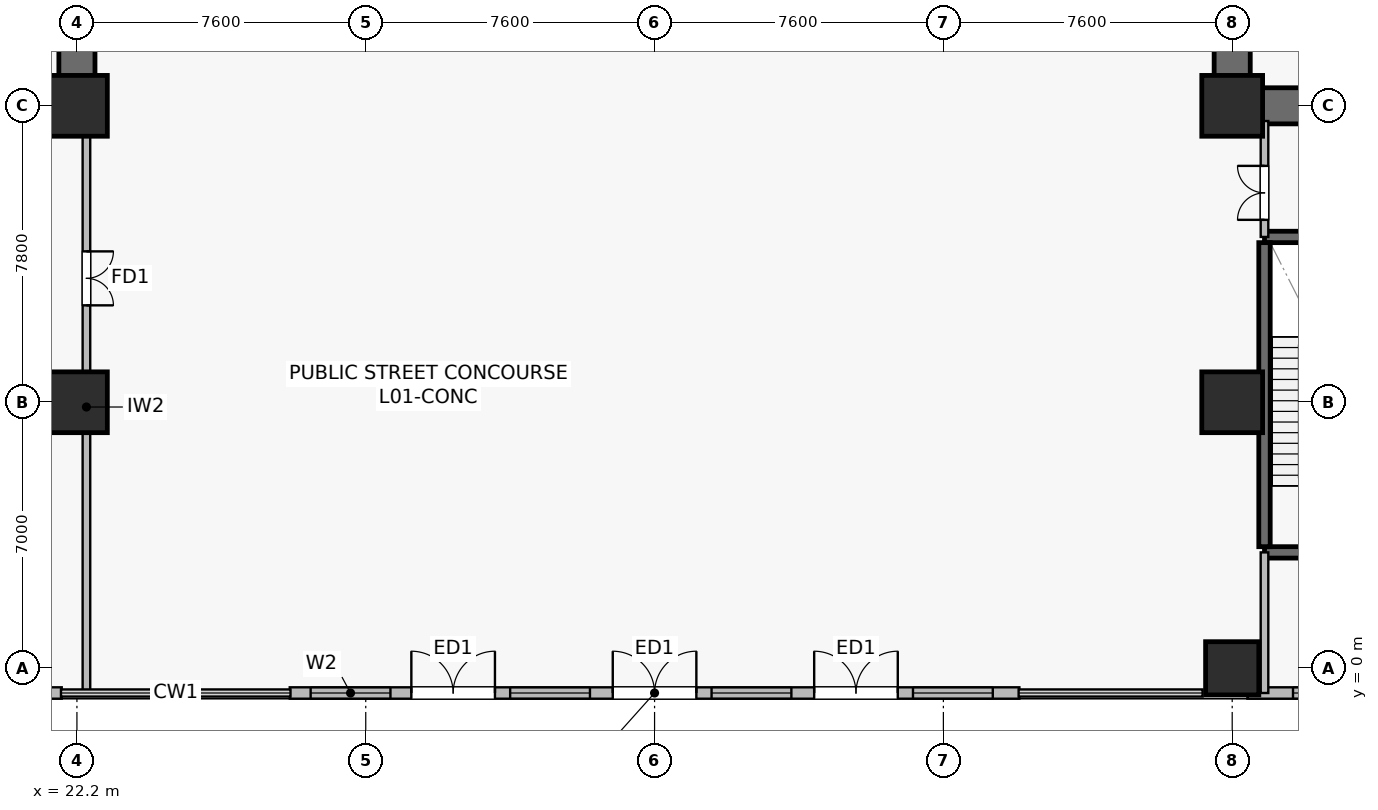
"""IFC4 building model, lengths in metres.
Left out: names, types, materials, properties, quantities, classifications, styles, units other than length and angle.
Written with IfcOpenShell. Run it as: python <this file> out.ifc"""

import sys

from ifc_helpers import new_model, si_unit, direction, frame, frame_2d, origin, origin_2d, place, context, subcontext, project, spatial, rectangle, extrude, source, transform, mapped, element, fill, save


model = new_model("IFC4")
c1 = context("Model", 3, precision=1e-05, world=origin(), true_north=direction((0.0, 1.0)))
c2 = subcontext(c1, "Body", "Model", "MODEL_VIEW")
j1 = project(units=[si_unit("LENGTHUNIT", "METRE"), si_unit("PLANEANGLEUNIT", "RADIAN")], contexts=[c1])
p1 = place(None, origin())
s1 = spatial("IfcSite", under=j1, at=p1, CompositionType="ELEMENT")
p2 = place(p1, origin())
s2 = spatial("IfcBuilding", under=s1, at=p2, CompositionType="ELEMENT")
p3 = place(p2, origin())
s3 = spatial("IfcBuildingStorey", under=s2, at=p3, CompositionType="ELEMENT", Elevation=0.0)
p4 = place(p3, frame((6.925, 14.8, 0.0), z_axis=(0.0, 0.0, 1.0), x_axis=(1.0, 0.0, 0.0)))
e1 = element("IfcWall", 1, at=p4, inside=s3, PredefinedType="SHEAR", context=c2, shape_type="SweptSolid", body=[
    extrude(rectangle(XDim=15.75, YDim=0.95, at=frame_2d((7.875, 0.0))), origin(), (0.0, 0.0, 1.0), 5.05),
])
p5 = place(p4, frame((12.275, 0.0, 0.0)))
e2 = element("IfcOpeningElement", 2, at=p5, cuts=e1, PredefinedType="OPENING", context=c2, shape_type="SweptSolid", body=[
    extrude(rectangle(XDim=1.2, YDim=2.16, at=frame_2d((0.6, 1.08))), frame((0.0, 0.485, 0.0), z_axis=(0.0, -1.0, 0.0), x_axis=(1.0, 0.0, 0.0)), (0.0, 0.0, 1.0), 0.97),
])
p6 = place(p3, frame((22.2, 15.275, 0.0), z_axis=(0.0, 0.0, 1.0), x_axis=(0.0, 1.0, 0.0)))
e3 = element("IfcWall", 3, at=p6, inside=s3, PredefinedType="SHEAR", context=c2, shape_type="SweptSolid", body=[
    extrude(rectangle(XDim=18.05, YDim=0.95, at=frame_2d((9.025, 0.0))), origin(), (0.0, 0.0, 1.0), 5.05),
])
p7 = place(p6, frame((3.275, 0.0, 0.0)))
e4 = element("IfcOpeningElement", 4, at=p7, cuts=e3, PredefinedType="OPENING", context=c2, shape_type="SweptSolid", body=[
    extrude(rectangle(XDim=1.42, YDim=2.2, at=frame_2d((0.71, 1.1))), frame((0.0, 0.485, 0.0), z_axis=(0.0, -1.0, 0.0), x_axis=(1.0, 0.0, 0.0)), (0.0, 0.0, 1.0), 0.97),
])
p8 = place(p3, frame((52.125, 14.8, 0.0), z_axis=(0.0, 0.0, 1.0), x_axis=(1.0, 0.0, 0.0)))
e5 = element("IfcWall", 5, at=p8, inside=s3, PredefinedType="SHEAR", context=c2, shape_type="SweptSolid", body=[
    extrude(rectangle(XDim=15.75, YDim=0.95, at=frame_2d((7.875, 0.0))), origin(), (0.0, 0.0, 1.0), 5.05),
])
p9 = place(p8, frame((2.275, 0.0, 0.0)))
e6 = element("IfcOpeningElement", 6, at=p9, cuts=e5, PredefinedType="OPENING", context=c2, shape_type="SweptSolid", body=[
    extrude(rectangle(XDim=1.2, YDim=2.16, at=frame_2d((0.6, 1.08))), frame((0.0, 0.485, 0.0), z_axis=(0.0, -1.0, 0.0), x_axis=(1.0, 0.0, 0.0)), (0.0, 0.0, 1.0), 0.97),
])
p10 = place(p3, frame((52.6, 15.275, 0.0), z_axis=(0.0, 0.0, 1.0), x_axis=(0.0, 1.0, 0.0)))
e7 = element("IfcWall", 7, at=p10, inside=s3, PredefinedType="SHEAR", context=c2, shape_type="SweptSolid", body=[
    extrude(rectangle(XDim=18.05, YDim=0.95, at=frame_2d((9.025, 0.0))), origin(), (0.0, 0.0, 1.0), 5.05),
])
p11 = place(p10, frame((3.275, 0.0, 0.0)))
e8 = element("IfcOpeningElement", 8, at=p11, cuts=e7, PredefinedType="OPENING", context=c2, shape_type="SweptSolid", body=[
    extrude(rectangle(XDim=1.42, YDim=2.2, at=frame_2d((0.71, 1.1))), frame((0.0, 0.485, 0.0), z_axis=(0.0, -1.0, 0.0), x_axis=(1.0, 0.0, 0.0)), (0.0, 0.0, 1.0), 0.97),
])
for number, where, z_axis, x_axis in (
    (9, (53.45, 3.05, 0.0), (0.0, 0.0, 1.0), (1.0, 0.0, 0.0)),
    (10, (53.45, 11.35, 0.0), (0.0, 0.0, 1.0), (1.0, 0.0, 0.0)),
):
    element("IfcWall", number, at=place(p3, frame(where, z_axis=z_axis, x_axis=x_axis)), inside=s3, PredefinedType="SHEAR", context=c2, shape_type="SweptSolid", body=[
        extrude(rectangle(XDim=3.5, YDim=0.3, at=frame_2d((1.75, 0.0))), origin(), (0.0, 0.0, 1.0), 5.05),
    ])
p12 = place(p3, frame((53.45, 3.2, 0.0), z_axis=(0.0, 0.0, 1.0), x_axis=(0.0, 1.0, 0.0)))
e11 = element("IfcWall", 11, at=p12, inside=s3, PredefinedType="SHEAR", context=c2, shape_type="SweptSolid", body=[
    extrude(rectangle(XDim=8.0, YDim=0.3, at=frame_2d((4.0, 0.0))), origin(), (0.0, 0.0, 1.0), 5.05),
])
m1 = source(origin(), c2, "Body", "SweptSolid", [
    extrude(rectangle(XDim=1.6, YDim=1.6, at=origin_2d()), origin(), (0.0, 0.0, 1.0), 5.4),
])
for number, where, z_axis, x_axis in (
    (12, (22.2, 7.0, 0.0), (0.0, 0.0, 1.0), (1.0, 0.0, 0.0)),
    (13, (22.2, 14.8, 0.0), (0.0, 0.0, 1.0), (1.0, 0.0, 0.0)),
    (14, (52.6, 7.0, 0.0), (0.0, 0.0, 1.0), (1.0, 0.0, 0.0)),
    (15, (52.6, 14.8, 0.0), (0.0, 0.0, 1.0), (1.0, 0.0, 0.0)),
):
    element("IfcColumn", number, at=place(p3, frame(where, z_axis=z_axis, x_axis=x_axis)), inside=s3, PredefinedType="COLUMN", context=c2, shape_type="MappedRepresentation", body=[
        mapped(m1, transform((0.0, 0.0, 0.0), scale=1.0)),
    ])
m2 = source(origin(), c2, "Body", "SweptSolid", [
    extrude(rectangle(XDim=1.4, YDim=1.4, at=origin_2d()), origin(), (0.0, 0.0, 1.0), 5.4),
])
p13 = place(p3, frame((52.6, 0.0, 0.0), z_axis=(0.0, 0.0, 1.0), x_axis=(1.0, 0.0, 0.0)))
e16 = element("IfcColumn", 16, at=p13, inside=s3, PredefinedType="COLUMN", context=c2, shape_type="MappedRepresentation", body=[
    mapped(m2, transform((0.0, 0.0, 0.0), scale=1.0)),
])
p14 = place(p3, frame((27.8, -0.65, 0.0), z_axis=(0.0, 0.0, 1.0), x_axis=(1.0, 0.0, 0.0)))
e17 = element("IfcWall", 17, at=p14, inside=s3, PredefinedType="STANDARD", context=c2, shape_type="SweptSolid", body=[
    extrude(rectangle(XDim=19.2, YDim=0.3, at=frame_2d((9.6, 0.0))), origin(), (0.0, 0.0, 1.0), 5.05),
])
p15 = place(p14, frame((3.2, 0.0, 0.0)))
e18 = element("IfcOpeningElement", 18, at=p15, cuts=e17, PredefinedType="OPENING", context=c2, shape_type="SweptSolid", body=[
    extrude(rectangle(XDim=2.2, YDim=2.6, at=frame_2d((1.1, 1.3))), frame((0.0, 0.16, 0.0), z_axis=(0.0, -1.0, 0.0), x_axis=(1.0, 0.0, 0.0)), (0.0, 0.0, 1.0), 0.32),
])
p16 = place(p14, frame((8.5, 0.0, 0.0)))
e19 = element("IfcOpeningElement", 19, at=p16, cuts=e17, PredefinedType="OPENING", context=c2, shape_type="SweptSolid", body=[
    extrude(rectangle(XDim=2.2, YDim=2.6, at=frame_2d((1.1, 1.3))), frame((0.0, 0.16, 0.0), z_axis=(0.0, -1.0, 0.0), x_axis=(1.0, 0.0, 0.0)), (0.0, 0.0, 1.0), 0.32),
])
p17 = place(p14, frame((13.8, 0.0, 0.0)))
e20 = element("IfcOpeningElement", 20, at=p17, cuts=e17, PredefinedType="OPENING", context=c2, shape_type="SweptSolid", body=[
    extrude(rectangle(XDim=2.2, YDim=2.6, at=frame_2d((1.1, 1.3))), frame((0.0, 0.16, 0.0), z_axis=(0.0, -1.0, 0.0), x_axis=(1.0, 0.0, 0.0)), (0.0, 0.0, 1.0), 0.32),
])
p18 = place(p14, frame((0.55, 0.0, 0.9)))
e21 = element("IfcOpeningElement", 21, at=p18, cuts=e17, PredefinedType="OPENING", context=c2, shape_type="SweptSolid", body=[
    extrude(rectangle(XDim=2.1, YDim=2.6, at=frame_2d((1.05, 1.3))), frame((0.0, 0.16, 0.0), z_axis=(0.0, -1.0, 0.0), x_axis=(1.0, 0.0, 0.0)), (0.0, 0.0, 1.0), 0.32),
])
p19 = place(p14, frame((5.8, 0.0, 0.9)))
e22 = element("IfcOpeningElement", 22, at=p19, cuts=e17, PredefinedType="OPENING", context=c2, shape_type="SweptSolid", body=[
    extrude(rectangle(XDim=2.1, YDim=2.6, at=frame_2d((1.05, 1.3))), frame((0.0, 0.16, 0.0), z_axis=(0.0, -1.0, 0.0), x_axis=(1.0, 0.0, 0.0)), (0.0, 0.0, 1.0), 0.32),
])
p20 = place(p14, frame((11.1, 0.0, 0.9)))
e23 = element("IfcOpeningElement", 23, at=p20, cuts=e17, PredefinedType="OPENING", context=c2, shape_type="SweptSolid", body=[
    extrude(rectangle(XDim=2.1, YDim=2.6, at=frame_2d((1.05, 1.3))), frame((0.0, 0.16, 0.0), z_axis=(0.0, -1.0, 0.0), x_axis=(1.0, 0.0, 0.0)), (0.0, 0.0, 1.0), 0.32),
])
p21 = place(p14, frame((16.4, 0.0, 0.9)))
e24 = element("IfcOpeningElement", 24, at=p21, cuts=e17, PredefinedType="OPENING", context=c2, shape_type="SweptSolid", body=[
    extrude(rectangle(XDim=2.1, YDim=2.6, at=frame_2d((1.05, 1.3))), frame((0.0, 0.16, 0.0), z_axis=(0.0, -1.0, 0.0), x_axis=(1.0, 0.0, 0.0)), (0.0, 0.0, 1.0), 0.32),
])
p22 = place(p3, frame((21.8, -0.65, 0.0), z_axis=(0.0, 0.0, 1.0), x_axis=(-1.0, 0.0, 0.0)))
e25 = element("IfcWall", 25, at=p22, inside=s3, PredefinedType="STANDARD", context=c2, shape_type="SweptSolid", body=[
    extrude(rectangle(XDim=20.0, YDim=0.3, at=frame_2d((10.0, 0.0))), origin(), (0.0, 0.0, 1.0), 5.05),
])
p23 = place(p22, frame((9.1, 0.0, 0.0)))
e26 = element("IfcOpeningElement", 26, at=p23, cuts=e25, PredefinedType="OPENING", context=c2, shape_type="SweptSolid", body=[
    extrude(rectangle(XDim=1.8, YDim=2.3, at=frame_2d((0.9, 1.15))), frame((0.0, 0.16, 0.0), z_axis=(0.0, -1.0, 0.0), x_axis=(1.0, 0.0, 0.0)), (0.0, 0.0, 1.0), 0.32),
])
p24 = place(p22, frame((1.2, 0.0, 0.9)))
e27 = element("IfcOpeningElement", 27, at=p24, cuts=e25, PredefinedType="OPENING", context=c2, shape_type="SweptSolid", body=[
    extrude(rectangle(XDim=2.4, YDim=2.8, at=frame_2d((1.2, 1.4))), frame((0.0, 0.16, 0.0), z_axis=(0.0, -1.0, 0.0), x_axis=(1.0, 0.0, 0.0)), (0.0, 0.0, 1.0), 0.32),
])
p25 = place(p22, frame((5.2, 0.0, 0.9)))
e28 = element("IfcOpeningElement", 28, at=p25, cuts=e25, PredefinedType="OPENING", context=c2, shape_type="SweptSolid", body=[
    extrude(rectangle(XDim=2.4, YDim=2.8, at=frame_2d((1.2, 1.4))), frame((0.0, 0.16, 0.0), z_axis=(0.0, -1.0, 0.0), x_axis=(1.0, 0.0, 0.0)), (0.0, 0.0, 1.0), 0.32),
])
p26 = place(p22, frame((16.4, 0.0, 0.9)))
e29 = element("IfcOpeningElement", 29, at=p26, cuts=e25, PredefinedType="OPENING", context=c2, shape_type="SweptSolid", body=[
    extrude(rectangle(XDim=2.4, YDim=2.8, at=frame_2d((1.2, 1.4))), frame((0.0, 0.16, 0.0), z_axis=(0.0, -1.0, 0.0), x_axis=(1.0, 0.0, 0.0)), (0.0, 0.0, 1.0), 0.32),
])
p27 = place(p3, frame((73.0, -0.65, 0.0), z_axis=(0.0, 0.0, 1.0), x_axis=(-1.0, 0.0, 0.0)))
e30 = element("IfcWall", 30, at=p27, inside=s3, PredefinedType="STANDARD", context=c2, shape_type="SweptSolid", body=[
    extrude(rectangle(XDim=20.0, YDim=0.3, at=frame_2d((10.0, 0.0))), origin(), (0.0, 0.0, 1.0), 5.05),
])
p28 = place(p27, frame((9.1, 0.0, 0.0)))
e31 = element("IfcOpeningElement", 31, at=p28, cuts=e30, PredefinedType="OPENING", context=c2, shape_type="SweptSolid", body=[
    extrude(rectangle(XDim=1.8, YDim=2.3, at=frame_2d((0.9, 1.15))), frame((0.0, 0.16, 0.0), z_axis=(0.0, -1.0, 0.0), x_axis=(1.0, 0.0, 0.0)), (0.0, 0.0, 1.0), 0.32),
])
p29 = place(p27, frame((1.2, 0.0, 0.9)))
e32 = element("IfcOpeningElement", 32, at=p29, cuts=e30, PredefinedType="OPENING", context=c2, shape_type="SweptSolid", body=[
    extrude(rectangle(XDim=2.4, YDim=2.8, at=frame_2d((1.2, 1.4))), frame((0.0, 0.16, 0.0), z_axis=(0.0, -1.0, 0.0), x_axis=(1.0, 0.0, 0.0)), (0.0, 0.0, 1.0), 0.32),
])
p30 = place(p27, frame((5.2, 0.0, 0.9)))
e33 = element("IfcOpeningElement", 33, at=p30, cuts=e30, PredefinedType="OPENING", context=c2, shape_type="SweptSolid", body=[
    extrude(rectangle(XDim=2.4, YDim=2.8, at=frame_2d((1.2, 1.4))), frame((0.0, 0.16, 0.0), z_axis=(0.0, -1.0, 0.0), x_axis=(1.0, 0.0, 0.0)), (0.0, 0.0, 1.0), 0.32),
])
p31 = place(p27, frame((16.4, 0.0, 0.9)))
e34 = element("IfcOpeningElement", 34, at=p31, cuts=e30, PredefinedType="OPENING", context=c2, shape_type="SweptSolid", body=[
    extrude(rectangle(XDim=2.4, YDim=2.8, at=frame_2d((1.2, 1.4))), frame((0.0, 0.16, 0.0), z_axis=(0.0, -1.0, 0.0), x_axis=(1.0, 0.0, 0.0)), (0.0, 0.0, 1.0), 0.32),
])
p32 = place(p3, frame((22.45, 14.4, 0.0), z_axis=(0.0, 0.0, 1.0), x_axis=(0.0, -1.0, 0.0)))
e35 = element("IfcWall", 35, at=p32, inside=s3, PredefinedType="SOLIDWALL", context=c2, shape_type="SweptSolid", body=[
    extrude(rectangle(XDim=15.05, YDim=0.2, at=frame_2d((7.525, 0.0))), origin(), (0.0, 0.0, 1.0), 4.335),
])
p33 = place(p32, frame((3.43, 0.0, 0.0)))
e36 = element("IfcOpeningElement", 36, at=p33, cuts=e35, PredefinedType="OPENING", context=c2, shape_type="SweptSolid", body=[
    extrude(rectangle(XDim=1.42, YDim=2.2, at=frame_2d((0.71, 1.1))), frame((0.0, 0.11, 0.0), z_axis=(0.0, -1.0, 0.0), x_axis=(1.0, 0.0, 0.0)), (0.0, 0.0, 1.0), 0.22),
])
p34 = place(p3, frame((53.45, -0.65, 0.0), z_axis=(0.0, 0.0, 1.0), x_axis=(0.0, 1.0, 0.0)))
e37 = element("IfcWall", 37, at=p34, inside=s3, PredefinedType="SOLIDWALL", context=c2, shape_type="SweptSolid", body=[
    extrude(rectangle(XDim=3.7, YDim=0.2, at=frame_2d((1.85, 0.0))), origin(), (0.0, 0.0, 1.0), 5.05),
])
p35 = place(p3, frame((53.45, 11.35, 0.0), z_axis=(0.0, 0.0, 1.0), x_axis=(0.0, 1.0, 0.0)))
e38 = element("IfcWall", 38, at=p35, inside=s3, PredefinedType="SOLIDWALL", context=c2, shape_type="SweptSolid", body=[
    extrude(rectangle(XDim=3.05, YDim=0.2, at=frame_2d((1.525, 0.0))), origin(), (0.0, 0.0, 1.0), 5.05),
])
p36 = place(p35, frame((0.45, 0.0, 0.0)))
e39 = element("IfcOpeningElement", 39, at=p36, cuts=e38, PredefinedType="OPENING", context=c2, shape_type="SweptSolid", body=[
    extrude(rectangle(XDim=1.42, YDim=2.2, at=frame_2d((0.71, 1.1))), frame((0.0, 0.11, 0.0), z_axis=(0.0, -1.0, 0.0), x_axis=(1.0, 0.0, 0.0)), (0.0, 0.0, 1.0), 0.22),
])
m3 = source(origin(), c2, "Body", "SweptSolid", [
    extrude(rectangle(XDim=2.2, YDim=2.6, at=frame_2d((1.1, 1.3))), frame((0.0, 0.025, 0.0), z_axis=(0.0, -1.0, 0.0), x_axis=(1.0, 0.0, 0.0)), (0.0, 0.0, 1.0), 0.05),
])
p37 = place(p15, origin())
e40 = element("IfcDoor", 40, at=p37, inside=s3, OperationType="DOUBLE_DOOR_SINGLE_SWING", PredefinedType="DOOR", context=c2, shape_type="MappedRepresentation", body=[
    mapped(m3, transform((0.0, 0.0, 0.0), scale=1.0)),
])
fill(e18, e40)
p38 = place(p16, origin())
e41 = element("IfcDoor", 41, at=p38, inside=s3, OperationType="DOUBLE_DOOR_SINGLE_SWING", PredefinedType="DOOR", context=c2, shape_type="MappedRepresentation", body=[
    mapped(m3, transform((0.0, 0.0, 0.0), scale=1.0)),
])
fill(e19, e41)
p39 = place(p17, origin())
e42 = element("IfcDoor", 42, at=p39, inside=s3, OperationType="DOUBLE_DOOR_SINGLE_SWING", PredefinedType="DOOR", context=c2, shape_type="MappedRepresentation", body=[
    mapped(m3, transform((0.0, 0.0, 0.0), scale=1.0)),
])
fill(e20, e42)
m4 = source(origin(), c2, "Body", "SweptSolid", [
    extrude(rectangle(XDim=2.1, YDim=2.6, at=frame_2d((1.05, 1.3))), frame((0.0, 0.03, 0.0), z_axis=(0.0, -1.0, 0.0), x_axis=(1.0, 0.0, 0.0)), (0.0, 0.0, 1.0), 0.06),
])
p40 = place(p18, origin())
e43 = element("IfcWindow", 43, at=p40, inside=s3, PartitioningType="SINGLE_PANEL", PredefinedType="WINDOW", context=c2, shape_type="MappedRepresentation", body=[
    mapped(m4, transform((0.0, 0.0, 0.0), scale=1.0)),
])
fill(e21, e43)
p41 = place(p19, origin())
e44 = element("IfcWindow", 44, at=p41, inside=s3, PartitioningType="SINGLE_PANEL", PredefinedType="WINDOW", context=c2, shape_type="MappedRepresentation", body=[
    mapped(m4, transform((0.0, 0.0, 0.0), scale=1.0)),
])
fill(e22, e44)
p42 = place(p20, origin())
e45 = element("IfcWindow", 45, at=p42, inside=s3, PartitioningType="SINGLE_PANEL", PredefinedType="WINDOW", context=c2, shape_type="MappedRepresentation", body=[
    mapped(m4, transform((0.0, 0.0, 0.0), scale=1.0)),
])
fill(e23, e45)
p43 = place(p21, origin())
e46 = element("IfcWindow", 46, at=p43, inside=s3, PartitioningType="SINGLE_PANEL", PredefinedType="WINDOW", context=c2, shape_type="MappedRepresentation", body=[
    mapped(m4, transform((0.0, 0.0, 0.0), scale=1.0)),
])
fill(e24, e46)
m5 = source(origin(), c2, "Body", "SweptSolid", [
    extrude(rectangle(XDim=2.4, YDim=2.8, at=frame_2d((1.2, 1.4))), frame((0.0, 0.03, 0.0), z_axis=(0.0, -1.0, 0.0), x_axis=(1.0, 0.0, 0.0)), (0.0, 0.0, 1.0), 0.06),
])
p44 = place(p31, origin())
e47 = element("IfcWindow", 47, at=p44, inside=s3, PartitioningType="SINGLE_PANEL", PredefinedType="WINDOW", context=c2, shape_type="MappedRepresentation", body=[
    mapped(m5, transform((0.0, 0.0, 0.0), scale=1.0)),
])
fill(e34, e47)
m6 = source(origin(), c2, "Body", "SweptSolid", [
    extrude(rectangle(XDim=1.42, YDim=2.2, at=frame_2d((0.71, 1.1))), frame((0.0, 0.025, 0.0), z_axis=(0.0, -1.0, 0.0), x_axis=(1.0, 0.0, 0.0)), (0.0, 0.0, 1.0), 0.05),
])
p45 = place(p33, origin())
e48 = element("IfcDoor", 48, at=p45, inside=s3, OperationType="DOUBLE_DOOR_SINGLE_SWING", PredefinedType="DOOR", context=c2, shape_type="MappedRepresentation", body=[
    mapped(m6, transform((0.0, 0.0, 0.0), scale=1.0)),
])
fill(e36, e48)
p46 = place(p36, origin())
e49 = element("IfcDoor", 49, at=p46, inside=s3, OperationType="DOUBLE_DOOR_SINGLE_SWING", PredefinedType="DOOR", context=c2, shape_type="MappedRepresentation", body=[
    mapped(m6, transform((0.0, 0.0, 0.0), scale=1.0)),
])
fill(e39, e49)
save(model, sys.argv[1])
